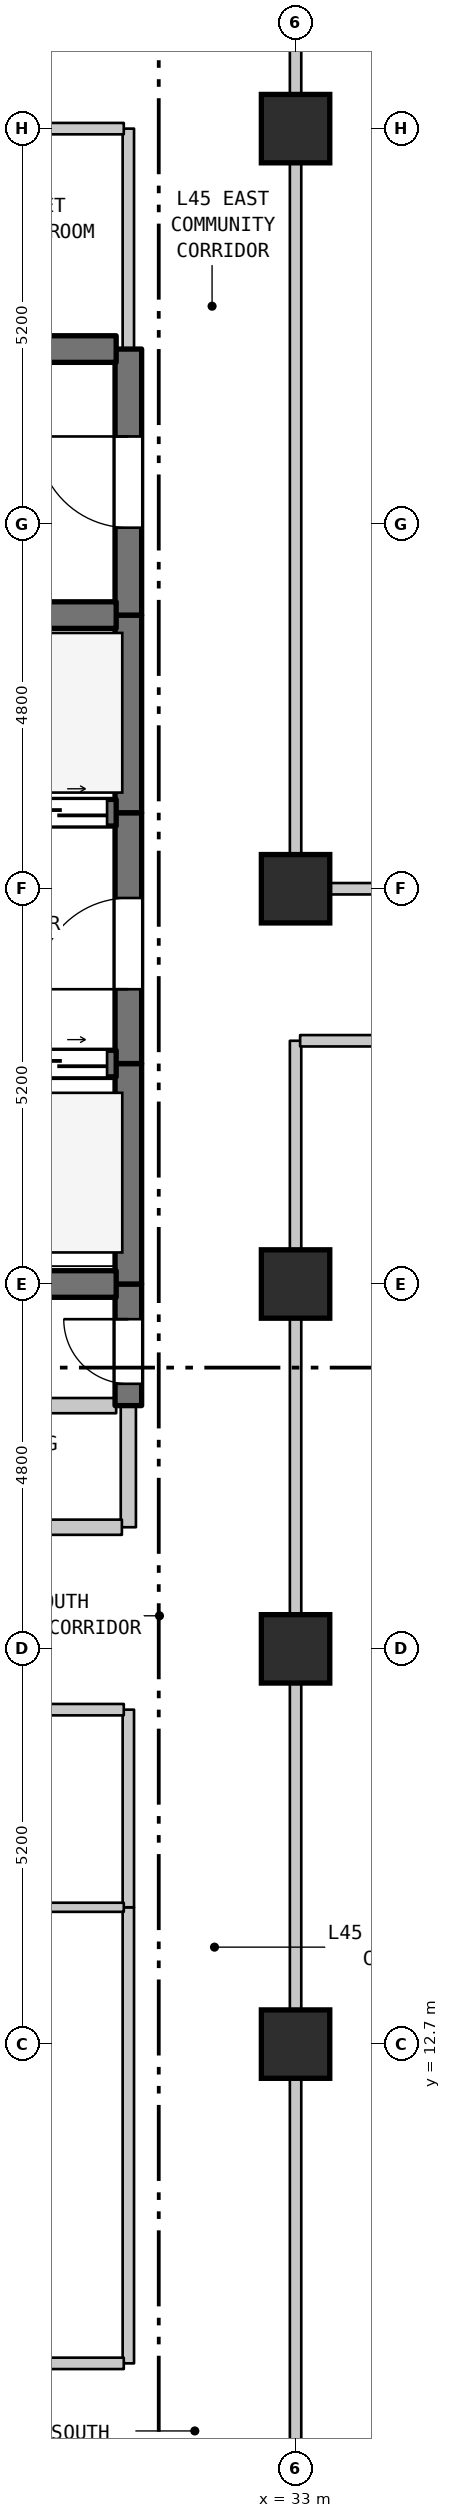
"""IFC4 building model, lengths in metres.
Left out: names, types, materials, properties, quantities, classifications, styles, units other than length and angle.
Written with IfcOpenShell. Run it as: python <this file> out.ifc"""

import sys

from ifc_helpers import new_model, si_unit, direction, frame, frame_2d, origin, origin_2d, place, context, subcontext, project, spatial, rectangle, extrude, element, fill, save


model = new_model("IFC4")
c1 = context("Model", 3, precision=1e-05, world=origin(), true_north=direction((0.0, 1.0)))
c2 = subcontext(c1, "Body", "Model", "MODEL_VIEW")
j1 = project(units=[si_unit("LENGTHUNIT", "METRE"), si_unit("PLANEANGLEUNIT", "RADIAN")], contexts=[c1])
p1 = place(None, origin())
s1 = spatial("IfcSite", under=j1, at=p1, CompositionType="ELEMENT")
p2 = place(p1, origin())
s2 = spatial("IfcBuilding", under=s1, at=p2, CompositionType="ELEMENT")
p3 = place(p2, frame((0.0, 0.0, 183.9)))
s3 = spatial("IfcBuildingStorey", under=s2, at=p3, CompositionType="ELEMENT", Elevation=183.9)
for number, where, z_axis, x_axis in (
    (1, (33.0, 12.7, 0.0), (0.0, 0.0, 1.0), (1.0, 0.0, 0.0)),
    (2, (33.0, 17.9, 0.0), (0.0, 0.0, 1.0), (1.0, 0.0, 0.0)),
    (3, (33.0, 22.7, 0.0), (0.0, 0.0, 1.0), (1.0, 0.0, 0.0)),
    (4, (33.0, 27.9, 0.0), (0.0, 0.0, 1.0), (1.0, 0.0, 0.0)),
    (5, (33.0, 37.9, 0.0), (0.0, 0.0, 1.0), (1.0, 0.0, 0.0)),
):
    element("IfcColumn", number, at=place(p3, frame(where, z_axis=z_axis, x_axis=x_axis)), inside=s3, PredefinedType="COLUMN", context=c2, shape_type="SweptSolid", body=[
        extrude(rectangle(XDim=0.9, YDim=0.9, at=origin_2d()), origin(), (0.0, 0.0, 1.0), 4.5),
    ])
p4 = place(p3, frame((30.8, 8.5, 0.0), z_axis=(0.0, 0.0, 1.0), x_axis=(0.0, 1.0, 0.0)))
e6 = element("IfcWall", 6, at=p4, inside=s3, PredefinedType="STANDARD", context=c2, shape_type="SweptSolid", body=[
    extrude(rectangle(XDim=6.0, YDim=0.15, at=frame_2d((3.0, 0.0))), origin(), (0.0, 0.0, 1.0), 4.19),
])
p5 = place(p3, frame((30.8, 14.5, 0.0), z_axis=(0.0, 0.0, 1.0), x_axis=(0.0, 1.0, 0.0)))
e7 = element("IfcWall", 7, at=p5, inside=s3, PredefinedType="STANDARD", context=c2, shape_type="SweptSolid", body=[
    extrude(rectangle(XDim=2.6, YDim=0.15, at=frame_2d((1.3, 0.0))), origin(), (0.0, 0.0, 1.0), 4.19),
])
p6 = place(p3, frame((30.8, 19.5, 0.0), z_axis=(0.0, 0.0, 1.0), x_axis=(0.0, 1.0, 0.0)))
e8 = element("IfcWall", 8, at=p6, inside=s3, PredefinedType="STANDARD", context=c2, shape_type="SweptSolid", body=[
    extrude(rectangle(XDim=1.6, YDim=0.2, at=frame_2d((0.8, 0.0))), origin(), (0.0, 0.0, 1.0), 4.19),
])
p7 = place(p3, frame((30.8, 21.1, 0.0), z_axis=(0.0, 0.0, 1.0), x_axis=(0.0, 1.0, 0.0)))
e9 = element("IfcWall", 9, at=p7, inside=s3, PredefinedType="SHEAR", context=c2, shape_type="SweptSolid", body=[
    extrude(rectangle(XDim=1.6, YDim=0.35, at=frame_2d((0.8, 0.0))), origin(), (0.0, 0.0, 1.0), 4.19),
])
p8 = place(p7, frame((0.287, 0.0, 0.0)))
e10 = element("IfcOpeningElement", 10, at=p8, cuts=e9, PredefinedType="OPENING", context=c2, shape_type="SweptSolid", body=[
    extrude(rectangle(XDim=0.85, YDim=2.1, at=frame_2d((0.425, 1.05))), frame((0.0, 0.185, 0.0), z_axis=(0.0, -1.0, 0.0), x_axis=(1.0, 0.0, 0.0)), (0.0, 0.0, 1.0), 0.37),
])
p9 = place(p3, frame((30.8, 22.7, 0.0), z_axis=(0.0, 0.0, 1.0), x_axis=(0.0, 1.0, 0.0)))
e11 = element("IfcWall", 11, at=p9, inside=s3, PredefinedType="SHEAR", context=c2, shape_type="SweptSolid", body=[
    extrude(rectangle(XDim=2.9, YDim=0.35, at=frame_2d((1.45, 0.0))), origin(), (0.0, 0.0, 1.0), 4.19),
])
p10 = place(p3, frame((30.8, 25.6, 0.0), z_axis=(0.0, 0.0, 1.0), x_axis=(0.0, 1.0, 0.0)))
e12 = element("IfcWall", 12, at=p10, inside=s3, PredefinedType="SHEAR", context=c2, shape_type="SweptSolid", body=[
    extrude(rectangle(XDim=3.3, YDim=0.35, at=frame_2d((1.65, 0.0))), origin(), (0.0, 0.0, 1.0), 4.19),
])
p11 = place(p10, frame((0.978, 0.0, 0.0)))
e13 = element("IfcOpeningElement", 13, at=p11, cuts=e12, PredefinedType="OPENING", context=c2, shape_type="SweptSolid", body=[
    extrude(rectangle(XDim=1.2, YDim=2.2, at=frame_2d((0.6, 1.1))), frame((0.0, 0.185, 0.0), z_axis=(0.0, -1.0, 0.0), x_axis=(1.0, 0.0, 0.0)), (0.0, 0.0, 1.0), 0.37),
])
p12 = place(p3, frame((30.8, 28.9, 0.0), z_axis=(0.0, 0.0, 1.0), x_axis=(0.0, 1.0, 0.0)))
e14 = element("IfcWall", 14, at=p12, inside=s3, PredefinedType="SHEAR", context=c2, shape_type="SweptSolid", body=[
    extrude(rectangle(XDim=2.6, YDim=0.35, at=frame_2d((1.3, 0.0))), origin(), (0.0, 0.0, 1.0), 4.19),
])
p13 = place(p3, frame((30.8, 31.5, 0.0), z_axis=(0.0, 0.0, 1.0), x_axis=(0.0, 1.0, 0.0)))
e15 = element("IfcWall", 15, at=p13, inside=s3, PredefinedType="SHEAR", context=c2, shape_type="SweptSolid", body=[
    extrude(rectangle(XDim=3.5, YDim=0.35, at=frame_2d((1.75, 0.0))), origin(), (0.0, 0.0, 1.0), 4.19),
])
p14 = place(p13, frame((1.15, 0.0, 0.0)))
e16 = element("IfcOpeningElement", 16, at=p14, cuts=e15, PredefinedType="OPENING", context=c2, shape_type="SweptSolid", body=[
    extrude(rectangle(XDim=1.2, YDim=2.2, at=frame_2d((0.6, 1.1))), frame((0.0, 0.185, 0.0), z_axis=(0.0, -1.0, 0.0), x_axis=(1.0, 0.0, 0.0)), (0.0, 0.0, 1.0), 0.37),
])
p15 = place(p3, frame((30.8, 35.0, 0.0), z_axis=(0.0, 0.0, 1.0), x_axis=(0.0, 1.0, 0.0)))
e17 = element("IfcWall", 17, at=p15, inside=s3, PredefinedType="STANDARD", context=c2, shape_type="SweptSolid", body=[
    extrude(rectangle(XDim=2.9, YDim=0.15, at=frame_2d((1.45, 0.0))), origin(), (0.0, 0.0, 1.0), 4.19),
])
p16 = place(p3, frame((33.0, 6.7, 0.0), z_axis=(0.0, 0.0, 1.0), x_axis=(0.0, 1.0, 0.0)))
e18 = element("IfcWall", 18, at=p16, inside=s3, PredefinedType="STANDARD", context=c2, shape_type="SweptSolid", body=[
    extrude(rectangle(XDim=19.2, YDim=0.15, at=frame_2d((9.6, 0.0))), origin(), (0.0, 0.0, 1.0), 3.79),
])
p17 = place(p3, frame((33.0, 27.9, 0.0), z_axis=(0.0, 0.0, 1.0), x_axis=(0.0, 1.0, 0.0)))
e19 = element("IfcWall", 19, at=p17, inside=s3, PredefinedType="STANDARD", context=c2, shape_type="SweptSolid", body=[
    extrude(rectangle(XDim=10.0, YDim=0.15, at=frame_2d((5.0, 0.0))), origin(), (0.0, 0.0, 1.0), 3.69),
])
p18 = place(p3, frame((25.245, 8.5, 0.0), z_axis=(0.0, 0.0, 1.0), x_axis=(1.0, 0.0, 0.0)))
e20 = element("IfcWall", 20, at=p18, inside=s3, PredefinedType="STANDARD", context=c2, shape_type="SweptSolid", body=[
    extrude(rectangle(XDim=5.495, YDim=0.15, at=frame_2d((2.748, 0.0))), origin(), (0.0, 0.0, 1.0), 4.19),
])
p19 = place(p18, frame((2.469, 0.0, 0.0)))
e21 = element("IfcOpeningElement", 21, at=p19, cuts=e20, PredefinedType="OPENING", context=c2, shape_type="SweptSolid", body=[
    extrude(rectangle(XDim=1.0, YDim=2.15, at=frame_2d((0.5, 1.075))), frame((0.0, 0.085, 0.0), z_axis=(0.0, -1.0, 0.0), x_axis=(1.0, 0.0, 0.0)), (0.0, 0.0, 1.0), 0.17),
])
p20 = place(p3, frame((27.045, 14.5, 0.0), z_axis=(0.0, 0.0, 1.0), x_axis=(1.0, 0.0, 0.0)))
e22 = element("IfcWall", 22, at=p20, inside=s3, PredefinedType="PARTITIONING", context=c2, shape_type="SweptSolid", body=[
    extrude(rectangle(XDim=3.695, YDim=0.12, at=frame_2d((1.848, 0.0))), origin(), (0.0, 0.0, 1.0), 4.19),
])
p21 = place(p3, frame((27.045, 17.1, 0.0), z_axis=(0.0, 0.0, 1.0), x_axis=(1.0, 0.0, 0.0)))
e23 = element("IfcWall", 23, at=p21, inside=s3, PredefinedType="STANDARD", context=c2, shape_type="SweptSolid", body=[
    extrude(rectangle(XDim=3.695, YDim=0.15, at=frame_2d((1.848, 0.0))), origin(), (0.0, 0.0, 1.0), 4.19),
])
p22 = place(p3, frame((27.285, 19.5, 0.0), z_axis=(0.0, 0.0, 1.0), x_axis=(1.0, 0.0, 0.0)))
e24 = element("IfcWall", 24, at=p22, inside=s3, PredefinedType="STANDARD", context=c2, shape_type="SweptSolid", body=[
    extrude(rectangle(XDim=3.43, YDim=0.2, at=frame_2d((1.715, 0.0))), origin(), (0.0, 0.0, 1.0), 4.19),
])
p23 = place(p22, frame((1.192, 0.0, 0.0)))
e25 = element("IfcOpeningElement", 25, at=p23, cuts=e24, PredefinedType="OPENING", context=c2, shape_type="SweptSolid", body=[
    extrude(rectangle(XDim=0.9, YDim=2.15, at=frame_2d((0.45, 1.075))), frame((0.0, 0.11, 0.0), z_axis=(0.0, -1.0, 0.0), x_axis=(1.0, 0.0, 0.0)), (0.0, 0.0, 1.0), 0.22),
])
p24 = place(p3, frame((27.285, 21.1, 0.0), z_axis=(0.0, 0.0, 1.0), x_axis=(1.0, 0.0, 0.0)))
e26 = element("IfcWall", 26, at=p24, inside=s3, PredefinedType="STANDARD", context=c2, shape_type="SweptSolid", body=[
    extrude(rectangle(XDim=3.355, YDim=0.2, at=frame_2d((1.677, 0.0))), origin(), (0.0, 0.0, 1.0), 4.19),
])
p25 = place(p3, frame((27.46, 22.7, 0.0), z_axis=(0.0, 0.0, 1.0), x_axis=(1.0, 0.0, 0.0)))
e27 = element("IfcWall", 27, at=p25, inside=s3, PredefinedType="SHEAR", context=c2, shape_type="SweptSolid", body=[
    extrude(rectangle(XDim=3.18, YDim=0.35, at=frame_2d((1.59, 0.0))), origin(), (0.0, 0.0, 1.0), 4.19),
])
p26 = place(p3, frame((27.46, 25.6, 0.0), z_axis=(0.0, 0.0, 1.0), x_axis=(1.0, 0.0, 0.0)))
e28 = element("IfcWall", 28, at=p26, inside=s3, PredefinedType="SHEAR", context=c2, shape_type="SweptSolid", body=[
    extrude(rectangle(XDim=3.18, YDim=0.35, at=frame_2d((1.59, 0.0))), origin(), (0.0, 0.0, 1.0), 4.19),
])
p27 = place(p26, frame((0.12, 0.0, 0.0)))
e29 = element("IfcOpeningElement", 29, at=p27, cuts=e28, PredefinedType="OPENING", context=c2, shape_type="SweptSolid", body=[
    extrude(rectangle(XDim=1.25, YDim=2.2, at=frame_2d((0.625, 1.1))), frame((0.0, 0.185, 0.0), z_axis=(0.0, -1.0, 0.0), x_axis=(1.0, 0.0, 0.0)), (0.0, 0.0, 1.0), 0.37),
])
p28 = place(p26, frame((1.81, 0.0, 0.0)))
e30 = element("IfcOpeningElement", 30, at=p28, cuts=e28, PredefinedType="OPENING", context=c2, shape_type="SweptSolid", body=[
    extrude(rectangle(XDim=1.25, YDim=2.2, at=frame_2d((0.625, 1.1))), frame((0.0, 0.185, 0.0), z_axis=(0.0, -1.0, 0.0), x_axis=(1.0, 0.0, 0.0)), (0.0, 0.0, 1.0), 0.37),
])
p29 = place(p3, frame((33.06, 25.9, 0.0), z_axis=(0.0, 0.0, 1.0), x_axis=(1.0, 0.0, 0.0)))
e31 = element("IfcWall", 31, at=p29, inside=s3, PredefinedType="STANDARD", context=c2, shape_type="SweptSolid", body=[
    extrude(rectangle(XDim=17.895, YDim=0.15, at=frame_2d((8.948, 0.0))), origin(), (0.0, 0.0, 1.0), 4.19),
])
p30 = place(p29, frame((8.369, 0.0, 0.0)))
e32 = element("IfcOpeningElement", 32, at=p30, cuts=e31, PredefinedType="OPENING", context=c2, shape_type="SweptSolid", body=[
    extrude(rectangle(XDim=1.0, YDim=2.15, at=frame_2d((0.5, 1.075))), frame((0.0, 0.085, 0.0), z_axis=(0.0, -1.0, 0.0), x_axis=(1.0, 0.0, 0.0)), (0.0, 0.0, 1.0), 0.17),
])
p31 = place(p3, frame((33.06, 27.9, 0.0), z_axis=(0.0, 0.0, 1.0), x_axis=(1.0, 0.0, 0.0)))
e33 = element("IfcWall", 33, at=p31, inside=s3, PredefinedType="STANDARD", context=c2, shape_type="SweptSolid", body=[
    extrude(rectangle(XDim=11.93, YDim=0.15, at=frame_2d((5.965, 0.0))), origin(), (0.0, 0.0, 1.0), 3.69),
])
p32 = place(p31, frame((6.26, 0.0, 0.0)))
e34 = element("IfcOpeningElement", 34, at=p32, cuts=e33, PredefinedType="OPENING", context=c2, shape_type="SweptSolid", body=[
    extrude(rectangle(XDim=1.2, YDim=2.2, at=frame_2d((0.6, 1.1))), frame((0.0, 0.085, 0.0), z_axis=(0.0, -1.0, 0.0), x_axis=(1.0, 0.0, 0.0)), (0.0, 0.0, 1.0), 0.17),
])
p33 = place(p3, frame((27.46, 28.9, 0.0), z_axis=(0.0, 0.0, 1.0), x_axis=(1.0, 0.0, 0.0)))
e35 = element("IfcWall", 35, at=p33, inside=s3, PredefinedType="SHEAR", context=c2, shape_type="SweptSolid", body=[
    extrude(rectangle(XDim=3.18, YDim=0.35, at=frame_2d((1.59, 0.0))), origin(), (0.0, 0.0, 1.0), 4.19),
])
p34 = place(p33, frame((0.12, 0.0, 0.0)))
e36 = element("IfcOpeningElement", 36, at=p34, cuts=e35, PredefinedType="OPENING", context=c2, shape_type="SweptSolid", body=[
    extrude(rectangle(XDim=1.25, YDim=2.2, at=frame_2d((0.625, 1.1))), frame((0.0, 0.185, 0.0), z_axis=(0.0, -1.0, 0.0), x_axis=(1.0, 0.0, 0.0)), (0.0, 0.0, 1.0), 0.37),
])
p35 = place(p33, frame((1.81, 0.0, 0.0)))
e37 = element("IfcOpeningElement", 37, at=p35, cuts=e35, PredefinedType="OPENING", context=c2, shape_type="SweptSolid", body=[
    extrude(rectangle(XDim=1.25, YDim=2.2, at=frame_2d((0.625, 1.1))), frame((0.0, 0.185, 0.0), z_axis=(0.0, -1.0, 0.0), x_axis=(1.0, 0.0, 0.0)), (0.0, 0.0, 1.0), 0.37),
])
p36 = place(p3, frame((27.46, 31.5, 0.0), z_axis=(0.0, 0.0, 1.0), x_axis=(1.0, 0.0, 0.0)))
e38 = element("IfcWall", 38, at=p36, inside=s3, PredefinedType="SHEAR", context=c2, shape_type="SweptSolid", body=[
    extrude(rectangle(XDim=3.18, YDim=0.35, at=frame_2d((1.59, 0.0))), origin(), (0.0, 0.0, 1.0), 4.19),
])
p37 = place(p3, frame((26.645, 35.0, 0.0), z_axis=(0.0, 0.0, 1.0), x_axis=(1.0, 0.0, 0.0)))
e39 = element("IfcWall", 39, at=p37, inside=s3, PredefinedType="SHEAR", context=c2, shape_type="SweptSolid", body=[
    extrude(rectangle(XDim=3.995, YDim=0.35, at=frame_2d((1.998, 0.0))), origin(), (0.0, 0.0, 1.0), 4.19),
])
p38 = place(p37, frame((1.508, 0.0, 0.0)))
e40 = element("IfcOpeningElement", 40, at=p38, cuts=e39, PredefinedType="OPENING", context=c2, shape_type="SweptSolid", body=[
    extrude(rectangle(XDim=0.95, YDim=2.15, at=frame_2d((0.475, 1.075))), frame((0.0, 0.185, 0.0), z_axis=(0.0, -1.0, 0.0), x_axis=(1.0, 0.0, 0.0)), (0.0, 0.0, 1.0), 0.37),
])
p39 = place(p3, frame((26.645, 37.9, 0.0), z_axis=(0.0, 0.0, 1.0), x_axis=(1.0, 0.0, 0.0)))
e41 = element("IfcWall", 41, at=p39, inside=s3, PredefinedType="STANDARD", context=c2, shape_type="SweptSolid", body=[
    extrude(rectangle(XDim=4.095, YDim=0.15, at=frame_2d((2.047, 0.0))), origin(), (0.0, 0.0, 1.0), 3.69),
])
p40 = place(p3, frame((33.0, 37.9, 0.0), z_axis=(0.0, 0.0, 1.0), x_axis=(0.0, 1.0, 0.0)))
e42 = element("IfcWall", 42, at=p40, inside=s3, PredefinedType="STANDARD", context=c2, shape_type="SweptSolid", body=[
    extrude(rectangle(XDim=2.4, YDim=0.15, at=frame_2d((1.2, 0.0))), origin(), (0.0, 0.0, 1.0), 3.59),
])
p41 = place(p8, origin())
e43 = element("IfcDoor", 43, at=p41, inside=s3, OperationType="SINGLE_SWING_RIGHT", PredefinedType="DOOR", context=c2, shape_type="SweptSolid", body=[
    extrude(rectangle(XDim=0.85, YDim=2.1, at=frame_2d((0.425, 1.05))), frame((0.0, 0.025, 0.0), z_axis=(0.0, -1.0, 0.0), x_axis=(1.0, 0.0, 0.0)), (0.0, 0.0, 1.0), 0.05),
])
fill(e10, e43)
p42 = place(p11, origin())
e44 = element("IfcDoor", 44, at=p42, inside=s3, OperationType="SINGLE_SWING_LEFT", PredefinedType="DOOR", context=c2, shape_type="SweptSolid", body=[
    extrude(rectangle(XDim=1.2, YDim=2.2, at=frame_2d((0.6, 1.1))), frame((0.0, 0.025, 0.0), z_axis=(0.0, -1.0, 0.0), x_axis=(1.0, 0.0, 0.0)), (0.0, 0.0, 1.0), 0.05),
])
fill(e13, e44)
p43 = place(p14, origin())
e45 = element("IfcDoor", 45, at=p43, inside=s3, OperationType="SINGLE_SWING_RIGHT", PredefinedType="DOOR", context=c2, shape_type="SweptSolid", body=[
    extrude(rectangle(XDim=1.2, YDim=2.2, at=frame_2d((0.6, 1.1))), frame((0.0, 0.025, 0.0), z_axis=(0.0, -1.0, 0.0), x_axis=(1.0, 0.0, 0.0)), (0.0, 0.0, 1.0), 0.05),
])
fill(e16, e45)
p44 = place(p28, origin())
e46 = element("IfcDoor", 46, at=p44, inside=s3, OperationType="DOUBLE_DOOR_SLIDING", PredefinedType="DOOR", context=c2, shape_type="SweptSolid", body=[
    extrude(rectangle(XDim=1.25, YDim=2.2, at=frame_2d((0.625, 1.1))), frame((0.0, 0.025, 0.0), z_axis=(0.0, -1.0, 0.0), x_axis=(1.0, 0.0, 0.0)), (0.0, 0.0, 1.0), 0.05),
])
fill(e30, e46)
p45 = place(p35, origin())
e47 = element("IfcDoor", 47, at=p45, inside=s3, OperationType="DOUBLE_DOOR_SLIDING", PredefinedType="DOOR", context=c2, shape_type="SweptSolid", body=[
    extrude(rectangle(XDim=1.25, YDim=2.2, at=frame_2d((0.625, 1.1))), frame((0.0, 0.025, 0.0), z_axis=(0.0, -1.0, 0.0), x_axis=(1.0, 0.0, 0.0)), (0.0, 0.0, 1.0), 0.05),
])
fill(e37, e47)
save(model, sys.argv[1])
